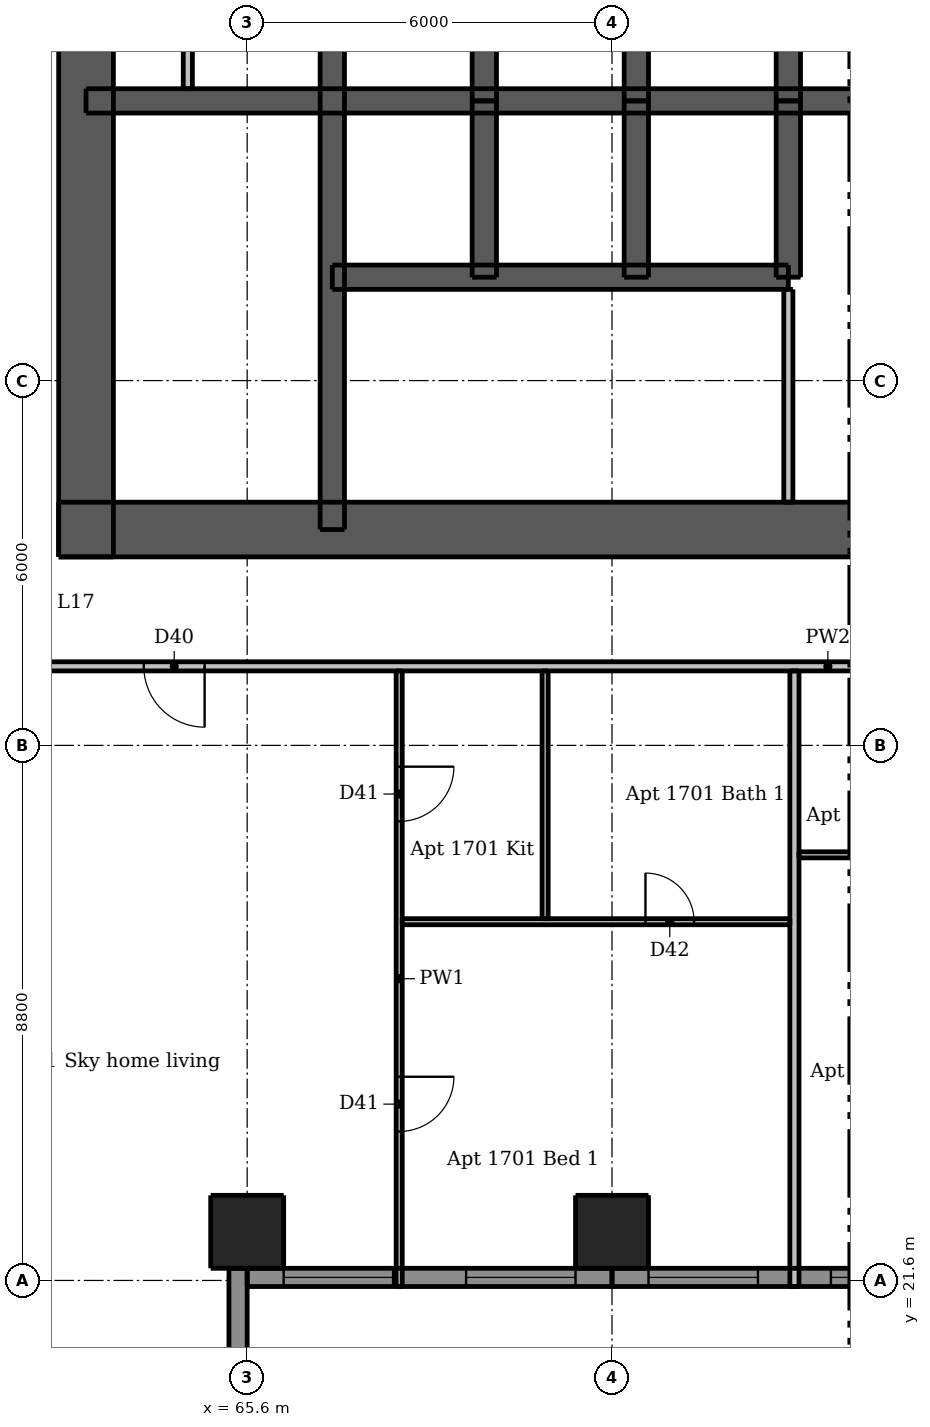
"""IFC4 building model, lengths in metres.
Left out: names, types, materials, properties, quantities, classifications, styles, units other than length and angle.
Written with IfcOpenShell. Run it as: python <this file> out.ifc"""

import sys

from ifc_helpers import new_model, si_unit, direction, frame, frame_2d, origin, origin_2d, place, context, subcontext, project, spatial, rectangle, extrude, element, fill, save


model = new_model("IFC4")
c1 = context("Model", 3, precision=1e-05, world=origin(), true_north=direction((0.0, 1.0)))
c2 = subcontext(c1, "Body", "Model", "MODEL_VIEW")
j1 = project(units=[si_unit("LENGTHUNIT", "METRE"), si_unit("PLANEANGLEUNIT", "RADIAN")], contexts=[c1])
p1 = place(None, origin())
s1 = spatial("IfcSite", under=j1, at=p1, CompositionType="ELEMENT")
p2 = place(p1, origin())
s2 = spatial("IfcBuilding", under=s1, at=p2, CompositionType="ELEMENT")
p3 = place(p2, frame((0.0, 0.0, 63.1)))
s3 = spatial("IfcBuildingStorey", under=s2, at=p3, CompositionType="ELEMENT", Elevation=63.1)
p4 = place(p3, frame((62.5, 33.95, 0.0), z_axis=(0.0, 0.0, 1.0), x_axis=(1.0, 0.0, 0.0)))
e1 = element("IfcWall", 1, at=p4, inside=s3, PredefinedType="SHEAR", context=c2, shape_type="SweptSolid", body=[
    extrude(rectangle(XDim=24.0, YDim=0.9, at=frame_2d((12.0, 0.0))), origin(), (0.0, 0.0, 1.0), 3.05),
])
p5 = place(p4, frame((2.05, 0.0, 0.0)))
e2 = element("IfcOpeningElement", 2, at=p5, cuts=e1, PredefinedType="OPENING", context=c2, shape_type="SweptSolid", body=[
    extrude(rectangle(XDim=1.1, YDim=2.1, at=frame_2d((0.55, 1.05))), frame((0.0, 0.46, 0.0), z_axis=(0.0, -1.0, 0.0), x_axis=(1.0, 0.0, 0.0)), (0.0, 0.0, 1.0), 0.92),
])
p6 = place(p4, frame((20.85, 0.0, 0.0)))
e3 = element("IfcOpeningElement", 3, at=p6, cuts=e1, PredefinedType="OPENING", context=c2, shape_type="SweptSolid", body=[
    extrude(rectangle(XDim=1.1, YDim=2.1, at=frame_2d((0.55, 1.05))), frame((0.0, 0.46, 0.0), z_axis=(0.0, -1.0, 0.0), x_axis=(1.0, 0.0, 0.0)), (0.0, 0.0, 1.0), 0.92),
])
p7 = place(p4, frame((8.0, 0.0, 0.0)))
e4 = element("IfcOpeningElement", 4, at=p7, cuts=e1, PredefinedType="OPENING", context=c2, shape_type="SweptSolid", body=[
    extrude(rectangle(XDim=1.1, YDim=2.1, at=frame_2d((0.55, 1.05))), frame((0.0, 0.46, 0.0), z_axis=(0.0, -1.0, 0.0), x_axis=(1.0, 0.0, 0.0)), (0.0, 0.0, 1.0), 0.92),
])
p8 = place(p4, frame((15.3, 0.0, 0.0)))
e5 = element("IfcOpeningElement", 5, at=p8, cuts=e1, PredefinedType="OPENING", context=c2, shape_type="SweptSolid", body=[
    extrude(rectangle(XDim=0.9, YDim=2.1, at=frame_2d((0.45, 1.05))), frame((0.0, 0.46, 0.0), z_axis=(0.0, -1.0, 0.0), x_axis=(1.0, 0.0, 0.0)), (0.0, 0.0, 1.0), 0.92),
])
p9 = place(p3, frame((62.95, 33.5, 0.0), z_axis=(0.0, 0.0, 1.0), x_axis=(0.0, 1.0, 0.0)))
e6 = element("IfcWall", 6, at=p9, inside=s3, PredefinedType="SHEAR", context=c2, shape_type="SweptSolid", body=[
    extrude(rectangle(XDim=24.0, YDim=0.9, at=frame_2d((12.0, 0.0))), origin(), (0.0, 0.0, 1.0), 3.05),
])
p10 = place(p9, frame((11.2, 0.0, 0.0)))
e7 = element("IfcOpeningElement", 7, at=p10, cuts=e6, PredefinedType="OPENING", context=c2, shape_type="SweptSolid", body=[
    extrude(rectangle(XDim=1.6, YDim=2.1, at=frame_2d((0.8, 1.05))), frame((0.0, 0.46, 0.0), z_axis=(0.0, -1.0, 0.0), x_axis=(1.0, 0.0, 0.0)), (0.0, 0.0, 1.0), 0.92),
])
p11 = place(p3, frame((62.95, 41.0, 0.0), z_axis=(0.0, 0.0, 1.0), x_axis=(1.0, 0.0, 0.0)))
e8 = element("IfcWall", 8, at=p11, inside=s3, PredefinedType="SHEAR", context=c2, shape_type="SweptSolid", body=[
    extrude(rectangle(XDim=23.1, YDim=0.4, at=frame_2d((11.55, 0.0))), origin(), (0.0, 0.0, 1.0), 3.05),
])
p12 = place(p3, frame((67.0, 33.95, 0.0), z_axis=(0.0, 0.0, 1.0), x_axis=(0.0, 1.0, 0.0)))
e9 = element("IfcWall", 9, at=p12, inside=s3, PredefinedType="SHEAR", context=c2, shape_type="SweptSolid", body=[
    extrude(rectangle(XDim=9.95, YDim=0.4, at=frame_2d((4.975, 0.0))), origin(), (0.0, 0.0, 1.0), 3.05),
])
p13 = place(p12, frame((0.65, 0.0, 0.0)))
e10 = element("IfcOpeningElement", 10, at=p13, cuts=e9, PredefinedType="OPENING", context=c2, shape_type="SweptSolid", body=[
    extrude(rectangle(XDim=1.1, YDim=2.1, at=frame_2d((0.55, 1.05))), frame((0.0, 0.21, 0.0), z_axis=(0.0, -1.0, 0.0), x_axis=(1.0, 0.0, 0.0)), (0.0, 0.0, 1.0), 0.42),
])
for number, where, z_axis, x_axis in (
    (11, (69.5, 41.0, 0.0), (0.0, 0.0, 1.0), (0.0, 1.0, 0.0)),
    (12, (72.0, 41.0, 0.0), (0.0, 0.0, 1.0), (0.0, 1.0, 0.0)),
    (13, (74.5, 41.0, 0.0), (0.0, 0.0, 1.0), (0.0, 1.0, 0.0)),
):
    element("IfcWall", number, at=place(p3, frame(where, z_axis=z_axis, x_axis=x_axis)), inside=s3, PredefinedType="SHEAR", context=c2, shape_type="SweptSolid", body=[
        extrude(rectangle(XDim=2.9, YDim=0.4, at=frame_2d((1.45, 0.0))), origin(), (0.0, 0.0, 1.0), 3.05),
    ])
p14 = place(p3, frame((67.0, 38.1, 0.0), z_axis=(0.0, 0.0, 1.0), x_axis=(1.0, 0.0, 0.0)))
e14 = element("IfcWall", 14, at=p14, inside=s3, PredefinedType="SHEAR", context=c2, shape_type="SweptSolid", body=[
    extrude(rectangle(XDim=7.5, YDim=0.4, at=frame_2d((3.75, 0.0))), origin(), (0.0, 0.0, 1.0), 3.05),
])
p15 = place(p14, frame((0.7, 0.0, 0.0)))
e15 = element("IfcOpeningElement", 15, at=p15, cuts=e14, PredefinedType="OPENING", context=c2, shape_type="SweptSolid", body=[
    extrude(rectangle(XDim=1.1, YDim=2.1, at=frame_2d((0.55, 1.05))), frame((0.0, 0.21, 0.0), z_axis=(0.0, -1.0, 0.0), x_axis=(1.0, 0.0, 0.0)), (0.0, 0.0, 1.0), 0.42),
])
p16 = place(p14, frame((3.2, 0.0, 0.0)))
e16 = element("IfcOpeningElement", 16, at=p16, cuts=e14, PredefinedType="OPENING", context=c2, shape_type="SweptSolid", body=[
    extrude(rectangle(XDim=1.1, YDim=2.1, at=frame_2d((0.55, 1.05))), frame((0.0, 0.21, 0.0), z_axis=(0.0, -1.0, 0.0), x_axis=(1.0, 0.0, 0.0)), (0.0, 0.0, 1.0), 0.42),
])
p17 = place(p14, frame((5.65, 0.0, 0.0)))
e17 = element("IfcOpeningElement", 17, at=p17, cuts=e14, PredefinedType="OPENING", context=c2, shape_type="SweptSolid", body=[
    extrude(rectangle(XDim=1.2, YDim=2.1, at=frame_2d((0.6, 1.05))), frame((0.0, 0.21, 0.0), z_axis=(0.0, -1.0, 0.0), x_axis=(1.0, 0.0, 0.0)), (0.0, 0.0, 1.0), 0.42),
])
for number, where, z_axis, x_axis in (
    (18, (69.5, 38.1, 0.0), (0.0, 0.0, 1.0), (0.0, 1.0, 0.0)),
    (19, (72.0, 38.1, 0.0), (0.0, 0.0, 1.0), (0.0, 1.0, 0.0)),
    (20, (74.5, 38.1, 0.0), (0.0, 0.0, 1.0), (0.0, 1.0, 0.0)),
):
    element("IfcWall", number, at=place(p3, frame(where, z_axis=z_axis, x_axis=x_axis)), inside=s3, PredefinedType="SHEAR", context=c2, shape_type="SweptSolid", body=[
        extrude(rectangle(XDim=2.9, YDim=0.4, at=frame_2d((1.45, 0.0))), origin(), (0.0, 0.0, 1.0), 3.05),
    ])
for number, where, z_axis, x_axis in (
    (21, (65.6, 22.4, 0.0), (0.0, 0.0, 1.0), (1.0, 0.0, 0.0)),
    (22, (71.6, 22.4, 0.0), (0.0, 0.0, 1.0), (1.0, 0.0, 0.0)),
):
    element("IfcColumn", number, at=place(p3, frame(where, z_axis=z_axis, x_axis=x_axis)), inside=s3, PredefinedType="COLUMN", context=c2, shape_type="SweptSolid", body=[
        extrude(rectangle(XDim=1.2, YDim=1.2, at=origin_2d()), origin(), (0.0, 0.0, 1.0), 3.05),
    ])
p18 = place(p3, frame((65.45, 20.0, 0.0), z_axis=(0.0, 0.0, 1.0), x_axis=(0.0, 1.0, 0.0)))
e23 = element("IfcWall", 23, at=p18, inside=s3, PredefinedType="SOLIDWALL", context=c2, shape_type="SweptSolid", body=[
    extrude(rectangle(XDim=1.8, YDim=0.3, at=frame_2d((0.9, 0.0))), origin(), (0.0, 0.0, 1.0), 3.05),
])
p19 = place(p3, frame((65.6, 21.65, 0.0), z_axis=(0.0, 0.0, 1.0), x_axis=(1.0, 0.0, 0.0)))
e24 = element("IfcWall", 24, at=p19, inside=s3, PredefinedType="SOLIDWALL", context=c2, shape_type="SweptSolid", body=[
    extrude(rectangle(XDim=6.0, YDim=0.3, at=frame_2d((3.0, 0.0))), origin(), (0.0, 0.0, 1.0), 3.05),
])
p20 = place(p19, frame((0.6, 0.0, 0.15)))
e25 = element("IfcOpeningElement", 25, at=p20, cuts=e24, PredefinedType="OPENING", context=c2, shape_type="SweptSolid", body=[
    extrude(rectangle(XDim=1.8, YDim=2.1, at=frame_2d((0.9, 1.05))), frame((0.0, 0.16, 0.0), z_axis=(0.0, -1.0, 0.0), x_axis=(1.0, 0.0, 0.0)), (0.0, 0.0, 1.0), 0.32),
])
p21 = place(p19, frame((3.6, 0.0, 0.15)))
e26 = element("IfcOpeningElement", 26, at=p21, cuts=e24, PredefinedType="OPENING", context=c2, shape_type="SweptSolid", body=[
    extrude(rectangle(XDim=1.8, YDim=2.1, at=frame_2d((0.9, 1.05))), frame((0.0, 0.16, 0.0), z_axis=(0.0, -1.0, 0.0), x_axis=(1.0, 0.0, 0.0)), (0.0, 0.0, 1.0), 0.32),
])
p22 = place(p3, frame((71.6, 21.65, 0.0), z_axis=(0.0, 0.0, 1.0), x_axis=(1.0, 0.0, 0.0)))
e27 = element("IfcWall", 27, at=p22, inside=s3, PredefinedType="SOLIDWALL", context=c2, shape_type="SweptSolid", body=[
    extrude(rectangle(XDim=5.7, YDim=0.3, at=frame_2d((2.85, 0.0))), origin(), (0.0, 0.0, 1.0), 3.05),
])
p23 = place(p22, frame((0.6, 0.0, 0.15)))
e28 = element("IfcOpeningElement", 28, at=p23, cuts=e27, PredefinedType="OPENING", context=c2, shape_type="SweptSolid", body=[
    extrude(rectangle(XDim=1.8, YDim=2.1, at=frame_2d((0.9, 1.05))), frame((0.0, 0.16, 0.0), z_axis=(0.0, -1.0, 0.0), x_axis=(1.0, 0.0, 0.0)), (0.0, 0.0, 1.0), 0.32),
])
p24 = place(p22, frame((3.6, 0.0, 0.15)))
e29 = element("IfcOpeningElement", 29, at=p24, cuts=e27, PredefinedType="OPENING", context=c2, shape_type="SweptSolid", body=[
    extrude(rectangle(XDim=1.8, YDim=2.1, at=frame_2d((0.9, 1.05))), frame((0.0, 0.16, 0.0), z_axis=(0.0, -1.0, 0.0), x_axis=(1.0, 0.0, 0.0)), (0.0, 0.0, 1.0), 0.32),
])
p25 = place(p3, frame((74.5, 34.4, 0.0), z_axis=(0.0, 0.0, 1.0), x_axis=(0.0, 1.0, 0.0)))
e30 = element("IfcWall", 30, at=p25, inside=s3, PredefinedType="PLUMBINGWALL", context=c2, shape_type="SweptSolid", body=[
    extrude(rectangle(XDim=3.5, YDim=0.15, at=frame_2d((1.75, 0.0))), origin(), (0.0, 0.0, 1.0), 3.05),
])
p26 = place(p3, frame((64.624, 41.2, 0.0), z_axis=(0.0, 0.0, 1.0), x_axis=(0.0, 1.0, 0.0)))
e31 = element("IfcWall", 31, at=p26, inside=s3, PredefinedType="PLUMBINGWALL", context=c2, shape_type="SweptSolid", body=[
    extrude(rectangle(XDim=2.5, YDim=0.15, at=frame_2d((1.25, 0.0))), origin(), (0.0, 0.0, 1.0), 3.05),
])
p27 = place(p3, frame((68.1, 31.625, 0.0), z_axis=(0.0, 0.0, 1.0), x_axis=(0.0, -1.0, 0.0)))
e32 = element("IfcWall", 32, at=p27, inside=s3, PredefinedType="PARTITIONING", context=c2, shape_type="SweptSolid", body=[
    extrude(rectangle(XDim=10.125, YDim=0.1, at=frame_2d((5.062, 0.0))), origin(), (0.0, 0.0, 1.0), 3.05),
])
p28 = place(p27, frame((1.575, 0.0, 0.0)))
e33 = element("IfcOpeningElement", 33, at=p28, cuts=e32, PredefinedType="OPENING", context=c2, shape_type="SweptSolid", body=[
    extrude(rectangle(XDim=0.9, YDim=2.1, at=frame_2d((0.45, 1.05))), frame((0.0, 0.06, 0.0), z_axis=(0.0, -1.0, 0.0), x_axis=(1.0, 0.0, 0.0)), (0.0, 0.0, 1.0), 0.12),
])
p29 = place(p27, frame((6.675, 0.0, 0.0)))
e34 = element("IfcOpeningElement", 34, at=p29, cuts=e32, PredefinedType="OPENING", context=c2, shape_type="SweptSolid", body=[
    extrude(rectangle(XDim=0.9, YDim=2.1, at=frame_2d((0.45, 1.05))), frame((0.0, 0.06, 0.0), z_axis=(0.0, -1.0, 0.0), x_axis=(1.0, 0.0, 0.0)), (0.0, 0.0, 1.0), 0.12),
])
p30 = place(p3, frame((70.5, 27.55, 0.0), z_axis=(0.0, 0.0, 1.0), x_axis=(0.0, 1.0, 0.0)))
e35 = element("IfcWall", 35, at=p30, inside=s3, PredefinedType="PARTITIONING", context=c2, shape_type="SweptSolid", body=[
    extrude(rectangle(XDim=4.075, YDim=0.1, at=frame_2d((2.038, 0.0))), origin(), (0.0, 0.0, 1.0), 3.05),
])
p31 = place(p3, frame((74.675, 28.6, 0.0), z_axis=(0.0, 0.0, 1.0), x_axis=(1.0, 0.0, 0.0)))
e36 = element("IfcWall", 36, at=p31, inside=s3, PredefinedType="PARTITIONING", context=c2, shape_type="SweptSolid", body=[
    extrude(rectangle(XDim=2.875, YDim=0.1, at=frame_2d((1.438, 0.0))), origin(), (0.0, 0.0, 1.0), 3.05),
])
p32 = place(p3, frame((68.15, 27.5, 0.0), z_axis=(0.0, 0.0, 1.0), x_axis=(1.0, 0.0, 0.0)))
e37 = element("IfcWall", 37, at=p32, inside=s3, PredefinedType="PARTITIONING", context=c2, shape_type="SweptSolid", body=[
    extrude(rectangle(XDim=6.375, YDim=0.1, at=frame_2d((3.188, 0.0))), origin(), (0.0, 0.0, 1.0), 3.05),
])
p33 = place(p32, frame((4.0, 0.0, 0.0)))
e38 = element("IfcOpeningElement", 38, at=p33, cuts=e37, PredefinedType="OPENING", context=c2, shape_type="SweptSolid", body=[
    extrude(rectangle(XDim=0.8, YDim=2.1, at=frame_2d((0.4, 1.05))), frame((0.0, 0.06, 0.0), z_axis=(0.0, -1.0, 0.0), x_axis=(1.0, 0.0, 0.0)), (0.0, 0.0, 1.0), 0.12),
])
p34 = place(p3, frame((74.6, 21.5, 0.0), z_axis=(0.0, 0.0, 1.0), x_axis=(0.0, 1.0, 0.0)))
e39 = element("IfcWall", 39, at=p34, inside=s3, PredefinedType="PARTITIONING", context=c2, shape_type="SweptSolid", body=[
    extrude(rectangle(XDim=10.125, YDim=0.15, at=frame_2d((5.062, 0.0))), origin(), (0.0, 0.0, 1.0), 3.05),
])
p35 = place(p3, frame((89.525, 31.7, 0.0), z_axis=(0.0, 0.0, 1.0), x_axis=(-1.0, 0.0, 0.0)))
e40 = element("IfcWall", 40, at=p35, inside=s3, PredefinedType="PARTITIONING", context=c2, shape_type="SweptSolid", body=[
    extrude(rectangle(XDim=28.75, YDim=0.15, at=frame_2d((14.375, 0.0))), origin(), (0.0, 0.0, 1.0), 3.05),
])
p36 = place(p35, frame((24.625, 0.0, 0.0)))
e41 = element("IfcOpeningElement", 41, at=p36, cuts=e40, PredefinedType="OPENING", context=c2, shape_type="SweptSolid", body=[
    extrude(rectangle(XDim=1.0, YDim=2.1, at=frame_2d((0.5, 1.05))), frame((0.0, 0.085, 0.0), z_axis=(0.0, -1.0, 0.0), x_axis=(1.0, 0.0, 0.0)), (0.0, 0.0, 1.0), 0.17),
])
p37 = place(p35, frame((8.425, 0.0, 0.0)))
e42 = element("IfcOpeningElement", 42, at=p37, cuts=e40, PredefinedType="OPENING", context=c2, shape_type="SweptSolid", body=[
    extrude(rectangle(XDim=1.0, YDim=2.1, at=frame_2d((0.5, 1.05))), frame((0.0, 0.085, 0.0), z_axis=(0.0, -1.0, 0.0), x_axis=(1.0, 0.0, 0.0)), (0.0, 0.0, 1.0), 0.17),
])
p38 = place(p20, origin())
e43 = element("IfcWindow", 43, at=p38, inside=s3, PartitioningType="DOUBLE_PANEL_VERTICAL", PredefinedType="WINDOW", context=c2, shape_type="SweptSolid", body=[
    extrude(rectangle(XDim=1.8, YDim=2.1, at=frame_2d((0.9, 1.05))), frame((0.0, 0.03, 0.0), z_axis=(0.0, -1.0, 0.0), x_axis=(1.0, 0.0, 0.0)), (0.0, 0.0, 1.0), 0.06),
])
fill(e25, e43)
p39 = place(p21, origin())
e44 = element("IfcWindow", 44, at=p39, inside=s3, PartitioningType="DOUBLE_PANEL_VERTICAL", PredefinedType="WINDOW", context=c2, shape_type="SweptSolid", body=[
    extrude(rectangle(XDim=1.8, YDim=2.1, at=frame_2d((0.9, 1.05))), frame((0.0, 0.03, 0.0), z_axis=(0.0, -1.0, 0.0), x_axis=(1.0, 0.0, 0.0)), (0.0, 0.0, 1.0), 0.06),
])
fill(e26, e44)
p40 = place(p23, origin())
e45 = element("IfcWindow", 45, at=p40, inside=s3, PartitioningType="DOUBLE_PANEL_VERTICAL", PredefinedType="WINDOW", context=c2, shape_type="SweptSolid", body=[
    extrude(rectangle(XDim=1.8, YDim=2.1, at=frame_2d((0.9, 1.05))), frame((0.0, 0.03, 0.0), z_axis=(0.0, -1.0, 0.0), x_axis=(1.0, 0.0, 0.0)), (0.0, 0.0, 1.0), 0.06),
])
fill(e28, e45)
p41 = place(p24, origin())
e46 = element("IfcWindow", 46, at=p41, inside=s3, PartitioningType="DOUBLE_PANEL_VERTICAL", PredefinedType="WINDOW", context=c2, shape_type="SweptSolid", body=[
    extrude(rectangle(XDim=1.8, YDim=2.1, at=frame_2d((0.9, 1.05))), frame((0.0, 0.03, 0.0), z_axis=(0.0, -1.0, 0.0), x_axis=(1.0, 0.0, 0.0)), (0.0, 0.0, 1.0), 0.06),
])
fill(e29, e46)
p42 = place(p5, origin())
e47 = element("IfcDoor", 47, at=p42, inside=s3, OperationType="SINGLE_SWING_LEFT", PredefinedType="DOOR", context=c2, shape_type="SweptSolid", body=[
    extrude(rectangle(XDim=1.1, YDim=2.1, at=frame_2d((0.55, 1.05))), frame((0.0, 0.438, 0.0), z_axis=(0.0, -1.0, 0.0), x_axis=(1.0, 0.0, 0.0)), (0.0, 0.0, 1.0), 0.05),
])
fill(e2, e47)
p43 = place(p7, origin())
e48 = element("IfcDoor", 48, at=p43, inside=s3, OperationType="SINGLE_SWING_LEFT", PredefinedType="DOOR", context=c2, shape_type="SweptSolid", body=[
    extrude(rectangle(XDim=1.1, YDim=2.1, at=frame_2d((0.55, 1.05))), frame((0.0, 0.438, 0.0), z_axis=(0.0, -1.0, 0.0), x_axis=(1.0, 0.0, 0.0)), (0.0, 0.0, 1.0), 0.05),
])
fill(e4, e48)
p44 = place(p13, origin())
e49 = element("IfcDoor", 49, at=p44, inside=s3, OperationType="SINGLE_SWING_RIGHT", PredefinedType="DOOR", context=c2, shape_type="SweptSolid", body=[
    extrude(rectangle(XDim=1.1, YDim=2.1, at=frame_2d((0.55, 1.05))), frame((0.0, -0.138, 0.0), z_axis=(0.0, -1.0, 0.0), x_axis=(1.0, 0.0, 0.0)), (0.0, 0.0, 1.0), 0.05),
])
fill(e10, e49)
p45 = place(p15, origin())
e50 = element("IfcDoor", 50, at=p45, inside=s3, OperationType="DOUBLE_DOOR_SLIDING", PredefinedType="DOOR", context=c2, shape_type="SweptSolid", body=[
    extrude(rectangle(XDim=1.1, YDim=2.1, at=frame_2d((0.55, 1.05))), frame((0.0, 0.025, 0.0), z_axis=(0.0, -1.0, 0.0), x_axis=(1.0, 0.0, 0.0)), (0.0, 0.0, 1.0), 0.05),
])
fill(e15, e50)
p46 = place(p16, origin())
e51 = element("IfcDoor", 51, at=p46, inside=s3, OperationType="DOUBLE_DOOR_SLIDING", PredefinedType="DOOR", context=c2, shape_type="SweptSolid", body=[
    extrude(rectangle(XDim=1.1, YDim=2.1, at=frame_2d((0.55, 1.05))), frame((0.0, 0.025, 0.0), z_axis=(0.0, -1.0, 0.0), x_axis=(1.0, 0.0, 0.0)), (0.0, 0.0, 1.0), 0.05),
])
fill(e16, e51)
p47 = place(p17, origin())
e52 = element("IfcDoor", 52, at=p47, inside=s3, OperationType="DOUBLE_DOOR_SLIDING", PredefinedType="DOOR", context=c2, shape_type="SweptSolid", body=[
    extrude(rectangle(XDim=1.2, YDim=2.1, at=frame_2d((0.6, 1.05))), frame((0.0, 0.025, 0.0), z_axis=(0.0, -1.0, 0.0), x_axis=(1.0, 0.0, 0.0)), (0.0, 0.0, 1.0), 0.05),
])
fill(e17, e52)
p48 = place(p36, origin())
e53 = element("IfcDoor", 53, at=p48, inside=s3, OperationType="SINGLE_SWING_LEFT", PredefinedType="DOOR", context=c2, shape_type="SweptSolid", body=[
    extrude(rectangle(XDim=1.0, YDim=2.1, at=frame_2d((0.5, 1.05))), frame((0.0, 0.025, 0.0), z_axis=(0.0, -1.0, 0.0), x_axis=(1.0, 0.0, 0.0)), (0.0, 0.0, 1.0), 0.05),
])
fill(e41, e53)
p49 = place(p28, origin())
e54 = element("IfcDoor", 54, at=p49, inside=s3, OperationType="SINGLE_SWING_LEFT", PredefinedType="DOOR", context=c2, shape_type="SweptSolid", body=[
    extrude(rectangle(XDim=0.9, YDim=2.1, at=frame_2d((0.45, 1.05))), frame((0.0, 0.025, 0.0), z_axis=(0.0, -1.0, 0.0), x_axis=(1.0, 0.0, 0.0)), (0.0, 0.0, 1.0), 0.05),
])
fill(e33, e54)
p50 = place(p29, origin())
e55 = element("IfcDoor", 55, at=p50, inside=s3, OperationType="SINGLE_SWING_LEFT", PredefinedType="DOOR", context=c2, shape_type="SweptSolid", body=[
    extrude(rectangle(XDim=0.9, YDim=2.1, at=frame_2d((0.45, 1.05))), frame((0.0, 0.025, 0.0), z_axis=(0.0, -1.0, 0.0), x_axis=(1.0, 0.0, 0.0)), (0.0, 0.0, 1.0), 0.05),
])
fill(e34, e55)
p51 = place(p33, origin())
e56 = element("IfcDoor", 56, at=p51, inside=s3, OperationType="SINGLE_SWING_LEFT", PredefinedType="DOOR", context=c2, shape_type="SweptSolid", body=[
    extrude(rectangle(XDim=0.8, YDim=2.1, at=frame_2d((0.4, 1.05))), frame((0.0, 0.025, 0.0), z_axis=(0.0, -1.0, 0.0), x_axis=(1.0, 0.0, 0.0)), (0.0, 0.0, 1.0), 0.05),
])
fill(e38, e56)
save(model, sys.argv[1])
